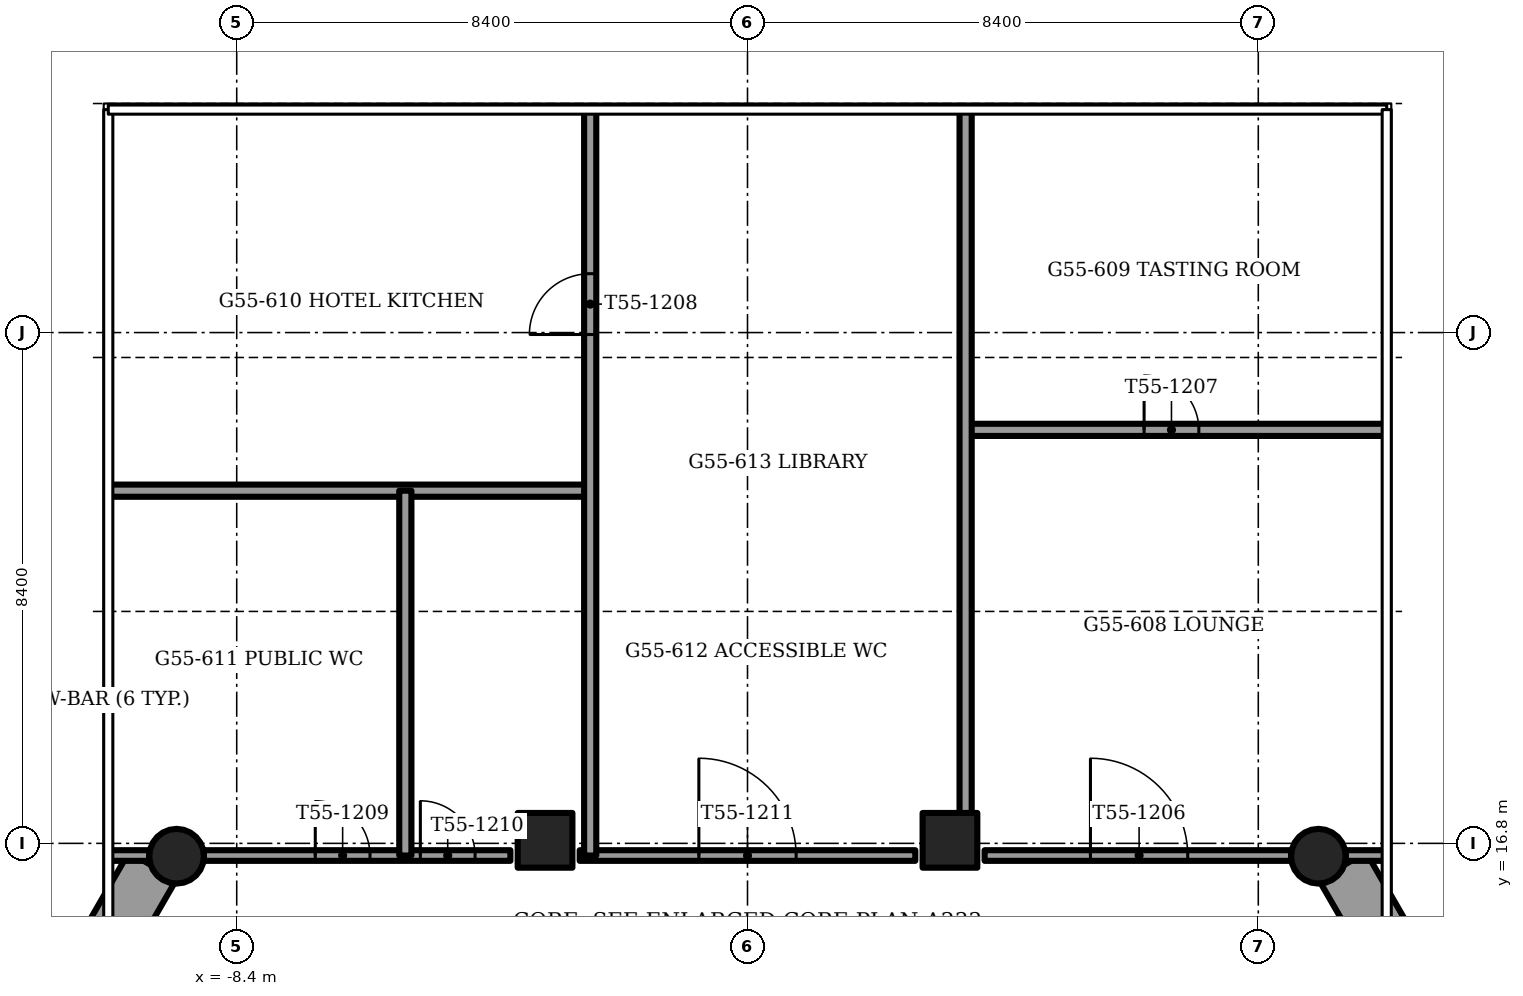
"""IFC4 building model, lengths in metres.
Left out: names, types, materials, properties, quantities, classifications, styles, units other than length and angle.
Written with IfcOpenShell. Run it as: python <this file> out.ifc"""

import sys

from ifc_helpers import new_model, si_unit, direction, frame, frame_2d, origin, origin_2d, place, context, subcontext, project, spatial, rectangle, circle, extrude, element, fill, save


model = new_model("IFC4")
c1 = context("Model", 3, precision=1e-05, world=origin(), true_north=direction((0.0, 1.0)))
c2 = subcontext(c1, "Body", "Model", "MODEL_VIEW")
j1 = project(units=[si_unit("LENGTHUNIT", "METRE"), si_unit("PLANEANGLEUNIT", "RADIAN")], contexts=[c1])
p1 = place(None, origin())
s1 = spatial("IfcSite", under=j1, at=p1, CompositionType="ELEMENT")
p2 = place(p1, origin())
s2 = spatial("IfcBuilding", under=s1, at=p2, CompositionType="ELEMENT")
p3 = place(p2, frame((0.0, 0.0, 222.0)))
s3 = spatial("IfcBuildingStorey", under=s2, at=p3, CompositionType="ELEMENT", Elevation=222.0)
for number, where, z_axis, x_axis in (
    (1, (-9.389, 16.589, -1.2), (0.0, 0.0, 1.0), (1.0, 0.0, 0.0)),
    (2, (9.389, 16.589, -1.2), (0.0, 0.0, 1.0), (1.0, 0.0, 0.0)),
):
    element("IfcColumn", number, at=place(p3, frame(where, z_axis=z_axis, x_axis=x_axis)), inside=s3, PredefinedType="COLUMN", context=c2, shape_type="SweptSolid", body=[
        extrude(circle(Radius=0.45, at=origin_2d()), origin(), (0.0, 0.0, 1.0), 3.75),
    ])
for number, where, z_axis, x_axis in (
    (3, (3.329, 16.85, -1.2), (0.0, 0.0, 1.0), (1.0, 0.0, 0.0)),
    (4, (-3.329, 16.85, -1.2), (0.0, 0.0, 1.0), (1.0, 0.0, 0.0)),
):
    element("IfcColumn", number, at=place(p3, frame(where, z_axis=z_axis, x_axis=x_axis)), inside=s3, PredefinedType="COLUMN", context=c2, shape_type="SweptSolid", body=[
        extrude(rectangle(XDim=0.9, YDim=0.9, at=origin_2d()), origin(), (0.0, 0.0, 1.0), 3.75),
    ])
for number, where, z_axis, x_axis in (
    (5, (-9.783, 16.428, 0.0), (0.0, 0.0, 1.0), (-0.5, -0.866, 0.0)),
    (6, (12.576, 11.59, 0.0), (0.0, 0.0, 1.0), (-0.5, 0.866, 0.0)),
):
    element("IfcWall", number, at=place(p3, frame(where, z_axis=z_axis, x_axis=x_axis)), inside=s3, PredefinedType="PARAPET", context=c2, shape_type="SweptSolid", body=[
        extrude(rectangle(XDim=5.586, YDim=0.9, at=frame_2d((2.793, 0.0))), origin(), (0.0, 0.0, 1.0), 1.1),
    ])
p4 = place(p3, frame((-10.493, 16.6, 0.0), z_axis=(0.0, 0.0, 1.0), x_axis=(1.0, 0.0, 0.0)))
e7 = element("IfcWall", 7, at=p4, inside=s3, PredefinedType="PARTITIONING", context=c2, shape_type="SweptSolid", body=[
    extrude(rectangle(XDim=0.656, YDim=0.175, at=frame_2d((0.328, 0.0))), origin(), (0.0, 0.0, 1.0), 3.45),
])
p5 = place(p3, frame((-8.94, 16.6, 0.0), z_axis=(0.0, 0.0, 1.0), x_axis=(1.0, 0.0, 0.0)))
e8 = element("IfcWall", 8, at=p5, inside=s3, PredefinedType="PARTITIONING", context=c2, shape_type="SweptSolid", body=[
    extrude(rectangle(XDim=5.041, YDim=0.175, at=frame_2d((2.521, 0.0))), origin(), (0.0, 0.0, 1.0), 3.45),
])
p6 = place(p5, frame((1.832, 0.0, 0.0)))
e9 = element("IfcOpeningElement", 9, at=p6, cuts=e8, PredefinedType="OPENING", context=c2, shape_type="SweptSolid", body=[
    extrude(rectangle(XDim=0.9, YDim=2.1, at=frame_2d((0.45, 1.05))), frame((0.0, 0.087, 0.0), z_axis=(0.0, -1.0, 0.0), x_axis=(1.0, 0.0, 0.0)), (0.0, 0.0, 1.0), 0.175),
])
p7 = place(p5, frame((3.56, 0.0, 0.0)))
e10 = element("IfcOpeningElement", 10, at=p7, cuts=e8, PredefinedType="OPENING", context=c2, shape_type="SweptSolid", body=[
    extrude(rectangle(XDim=0.9, YDim=2.1, at=frame_2d((0.45, 1.05))), frame((0.0, 0.087, 0.0), z_axis=(0.0, -1.0, 0.0), x_axis=(1.0, 0.0, 0.0)), (0.0, 0.0, 1.0), 0.175),
])
p8 = place(p3, frame((-2.76, 16.6, 0.0), z_axis=(0.0, 0.0, 1.0), x_axis=(1.0, 0.0, 0.0)))
e11 = element("IfcWall", 11, at=p8, inside=s3, PredefinedType="PARTITIONING", context=c2, shape_type="SweptSolid", body=[
    extrude(rectangle(XDim=5.52, YDim=0.175, at=frame_2d((2.76, 0.0))), origin(), (0.0, 0.0, 1.0), 3.45),
])
p9 = place(p8, frame((1.96, 0.0, 0.0)))
e12 = element("IfcOpeningElement", 12, at=p9, cuts=e11, PredefinedType="OPENING", context=c2, shape_type="SweptSolid", body=[
    extrude(rectangle(XDim=1.6, YDim=2.1, at=frame_2d((0.8, 1.05))), frame((0.0, 0.087, 0.0), z_axis=(0.0, -1.0, 0.0), x_axis=(1.0, 0.0, 0.0)), (0.0, 0.0, 1.0), 0.175),
])
p10 = place(p3, frame((3.899, 16.6, 0.0), z_axis=(0.0, 0.0, 1.0), x_axis=(1.0, 0.0, 0.0)))
e13 = element("IfcWall", 13, at=p10, inside=s3, PredefinedType="PARTITIONING", context=c2, shape_type="SweptSolid", body=[
    extrude(rectangle(XDim=5.041, YDim=0.175, at=frame_2d((2.521, 0.0))), origin(), (0.0, 0.0, 1.0), 3.45),
])
p11 = place(p10, frame((1.741, 0.0, 0.0)))
e14 = element("IfcOpeningElement", 14, at=p11, cuts=e13, PredefinedType="OPENING", context=c2, shape_type="SweptSolid", body=[
    extrude(rectangle(XDim=1.6, YDim=2.1, at=frame_2d((0.8, 1.05))), frame((0.0, 0.087, 0.0), z_axis=(0.0, -1.0, 0.0), x_axis=(1.0, 0.0, 0.0)), (0.0, 0.0, 1.0), 0.175),
])
p12 = place(p3, frame((9.837, 16.6, 0.0), z_axis=(0.0, 0.0, 1.0), x_axis=(1.0, 0.0, 0.0)))
e15 = element("IfcWall", 15, at=p12, inside=s3, PredefinedType="PARTITIONING", context=c2, shape_type="SweptSolid", body=[
    extrude(rectangle(XDim=0.656, YDim=0.175, at=frame_2d((0.328, 0.0))), origin(), (0.0, 0.0, 1.0), 3.45),
])
p13 = place(p3, frame((-10.493, 22.6, 0.0), z_axis=(0.0, 0.0, 1.0), x_axis=(1.0, 0.0, 0.0)))
e16 = element("IfcWall", 16, at=p13, inside=s3, PredefinedType="PARTITIONING", context=c2, shape_type="SweptSolid", body=[
    extrude(rectangle(XDim=7.906, YDim=0.2, at=frame_2d((3.953, 0.0))), origin(), (0.0, 0.0, 1.0), 3.45),
])
p14 = place(p3, frame((3.587, 23.6, 0.0), z_axis=(0.0, 0.0, 1.0), x_axis=(1.0, 0.0, 0.0)))
e17 = element("IfcWall", 17, at=p14, inside=s3, PredefinedType="PARTITIONING", context=c2, shape_type="SweptSolid", body=[
    extrude(rectangle(XDim=6.906, YDim=0.2, at=frame_2d((3.453, 0.0))), origin(), (0.0, 0.0, 1.0), 3.45),
])
p15 = place(p14, frame((2.935, 0.0, 0.0)))
e18 = element("IfcOpeningElement", 18, at=p15, cuts=e17, PredefinedType="OPENING", context=c2, shape_type="SweptSolid", body=[
    extrude(rectangle(XDim=0.9, YDim=2.1, at=frame_2d((0.45, 1.05))), frame((0.0, 0.1, 0.0), z_axis=(0.0, -1.0, 0.0), x_axis=(1.0, 0.0, 0.0)), (0.0, 0.0, 1.0), 0.2),
])
p16 = place(p3, frame((-5.627, 16.6, 0.0), z_axis=(0.0, 0.0, 1.0), x_axis=(0.0, 1.0, 0.0)))
e19 = element("IfcWall", 19, at=p16, inside=s3, PredefinedType="PARTITIONING", context=c2, shape_type="SweptSolid", body=[
    extrude(rectangle(XDim=6.0, YDim=0.2, at=frame_2d((3.0, 0.0))), origin(), (0.0, 0.0, 1.0), 2.839),
])
p17 = place(p3, frame((-2.587, 16.6, 0.0), z_axis=(0.0, 0.0, 1.0), x_axis=(0.0, 1.0, 0.0)))
e20 = element("IfcWall", 20, at=p17, inside=s3, PredefinedType="PARTITIONING", context=c2, shape_type="SweptSolid", body=[
    extrude(rectangle(XDim=12.248, YDim=0.2, at=frame_2d((6.124, 0.0))), origin(), (0.0, 0.0, 1.0), 2.839),
])
p18 = place(p17, frame((8.568, 0.0, 0.0)))
e21 = element("IfcOpeningElement", 21, at=p18, cuts=e20, PredefinedType="OPENING", context=c2, shape_type="SweptSolid", body=[
    extrude(rectangle(XDim=1.0, YDim=2.1, at=frame_2d((0.5, 1.05))), frame((0.0, 0.1, 0.0), z_axis=(0.0, -1.0, 0.0), x_axis=(1.0, 0.0, 0.0)), (0.0, 0.0, 1.0), 0.2),
])
p19 = place(p3, frame((3.587, 17.14, 0.0), z_axis=(0.0, 0.0, 1.0), x_axis=(0.0, 1.0, 0.0)))
e22 = element("IfcWall", 22, at=p19, inside=s3, PredefinedType="PARTITIONING", context=c2, shape_type="SweptSolid", body=[
    extrude(rectangle(XDim=11.708, YDim=0.2, at=frame_2d((5.854, 0.0))), origin(), (0.0, 0.0, 1.0), 2.839),
])
p20 = place(p11, origin())
e23 = element("IfcDoor", 23, at=p20, inside=s3, OperationType="DOUBLE_DOOR_SINGLE_SWING", PredefinedType="DOOR", context=c2, shape_type="SweptSolid", body=[
    extrude(rectangle(XDim=1.6, YDim=2.1, at=frame_2d((0.8, 1.05))), frame((0.0, 0.025, 0.0), z_axis=(0.0, -1.0, 0.0), x_axis=(1.0, 0.0, 0.0)), (0.0, 0.0, 1.0), 0.05),
])
fill(e14, e23)
p21 = place(p15, origin())
e24 = element("IfcDoor", 24, at=p21, inside=s3, OperationType="SINGLE_SWING_LEFT", PredefinedType="DOOR", context=c2, shape_type="SweptSolid", body=[
    extrude(rectangle(XDim=0.9, YDim=2.1, at=frame_2d((0.45, 1.05))), frame((0.0, 0.025, 0.0), z_axis=(0.0, -1.0, 0.0), x_axis=(1.0, 0.0, 0.0)), (0.0, 0.0, 1.0), 0.05),
])
fill(e18, e24)
p22 = place(p18, origin())
e25 = element("IfcDoor", 25, at=p22, inside=s3, OperationType="SINGLE_SWING_RIGHT", PredefinedType="DOOR", context=c2, shape_type="SweptSolid", body=[
    extrude(rectangle(XDim=1.0, YDim=2.1, at=frame_2d((0.5, 1.05))), frame((0.0, 0.025, 0.0), z_axis=(0.0, -1.0, 0.0), x_axis=(1.0, 0.0, 0.0)), (0.0, 0.0, 1.0), 0.05),
])
fill(e21, e25)
p23 = place(p6, origin())
e26 = element("IfcDoor", 26, at=p23, inside=s3, OperationType="SINGLE_SWING_LEFT", PredefinedType="DOOR", context=c2, shape_type="SweptSolid", body=[
    extrude(rectangle(XDim=0.9, YDim=2.1, at=frame_2d((0.45, 1.05))), frame((0.0, 0.025, 0.0), z_axis=(0.0, -1.0, 0.0), x_axis=(1.0, 0.0, 0.0)), (0.0, 0.0, 1.0), 0.05),
])
fill(e9, e26)
p24 = place(p7, origin())
e27 = element("IfcDoor", 27, at=p24, inside=s3, OperationType="SINGLE_SWING_RIGHT", PredefinedType="DOOR", context=c2, shape_type="SweptSolid", body=[
    extrude(rectangle(XDim=0.9, YDim=2.1, at=frame_2d((0.45, 1.05))), frame((0.0, 0.025, 0.0), z_axis=(0.0, -1.0, 0.0), x_axis=(1.0, 0.0, 0.0)), (0.0, 0.0, 1.0), 0.05),
])
fill(e10, e27)
p25 = place(p9, origin())
e28 = element("IfcDoor", 28, at=p25, inside=s3, OperationType="DOUBLE_DOOR_SINGLE_SWING", PredefinedType="DOOR", context=c2, shape_type="SweptSolid", body=[
    extrude(rectangle(XDim=1.6, YDim=2.1, at=frame_2d((0.8, 1.05))), frame((0.0, 0.025, 0.0), z_axis=(0.0, -1.0, 0.0), x_axis=(1.0, 0.0, 0.0)), (0.0, 0.0, 1.0), 0.05),
])
fill(e12, e28)
save(model, sys.argv[1])
